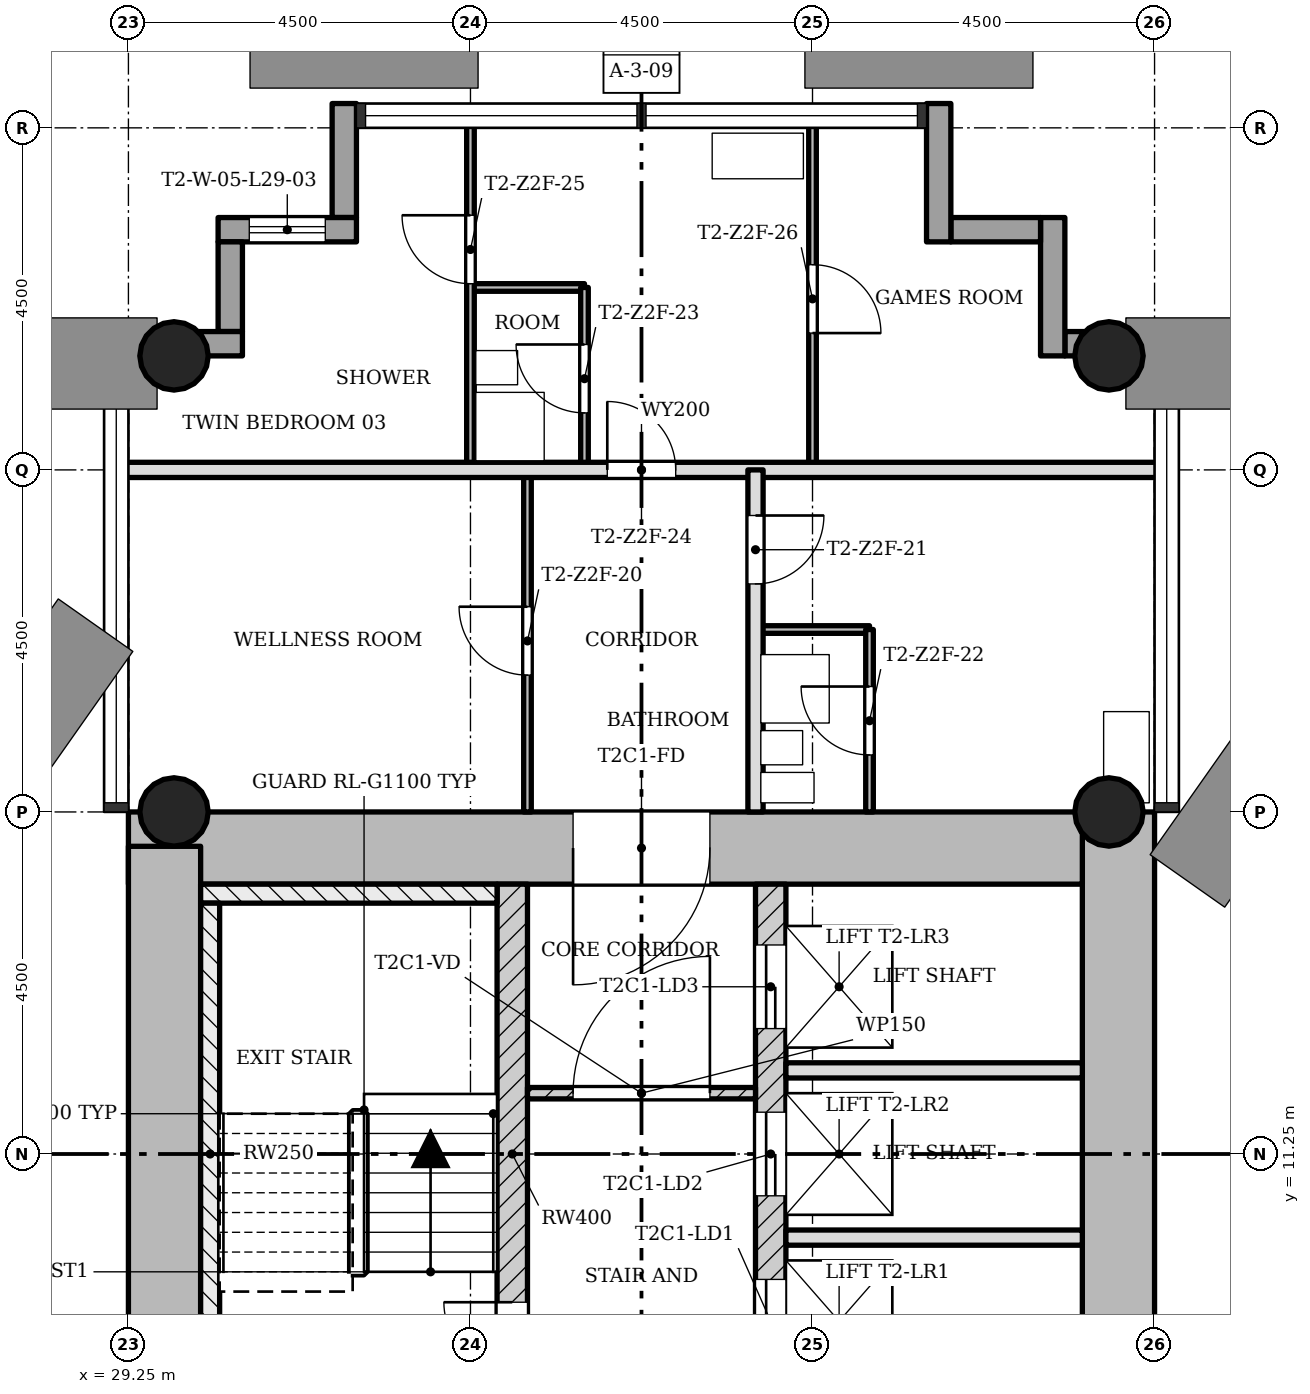
"""IFC4 building model, lengths in metres.
Left out: names, types, materials, properties, quantities, classifications, styles, units other than length and angle.
Written with IfcOpenShell. Run it as: python <this file> out.ifc"""

import sys

from ifc_helpers import new_model, si_unit, direction, frame, frame_2d, origin, origin_2d, place, context, subcontext, project, spatial, rectangle, hollow_circle, extrude, element, fill, save


model = new_model("IFC4")
c1 = context("Model", 3, precision=1e-05, world=origin(), true_north=direction((0.0, 1.0)))
c2 = subcontext(c1, "Body", "Model", "MODEL_VIEW")
j1 = project(units=[si_unit("LENGTHUNIT", "METRE"), si_unit("PLANEANGLEUNIT", "RADIAN")], contexts=[c1])
p1 = place(None, origin())
s1 = spatial("IfcSite", under=j1, at=p1, CompositionType="ELEMENT")
p2 = place(p1, origin())
s2 = spatial("IfcBuilding", under=s1, at=p2, CompositionType="ELEMENT")
p3 = place(p2, frame((0.0, 0.0, 107.2)))
s3 = spatial("IfcBuildingStorey", under=s2, at=p3, CompositionType="ELEMENT", Elevation=107.2)
p4 = place(p3, frame((42.275, 7.7, 0.0), z_axis=(0.0, 0.0, 1.0), x_axis=(0.0, 1.0, 0.0)))
e1 = element("IfcWall", 1, at=p4, inside=s3, PredefinedType="SHEAR", context=c2, shape_type="SweptSolid", body=[
    extrude(rectangle(XDim=8.05, YDim=0.95, at=frame_2d((4.025, 0.0))), origin(), (0.0, 0.0, 1.0), 3.4),
])
p5 = place(p3, frame((41.8, 15.275, 0.0), z_axis=(0.0, 0.0, 1.0), x_axis=(-1.0, 0.0, 0.0)))
e2 = element("IfcWall", 2, at=p5, inside=s3, PredefinedType="SHEAR", context=c2, shape_type="SweptSolid", body=[
    extrude(rectangle(XDim=12.55, YDim=0.95, at=frame_2d((6.275, 0.0))), origin(), (0.0, 0.0, 1.0), 3.4),
])
p6 = place(p5, frame((4.9, 0.0, 0.0)))
e3 = element("IfcOpeningElement", 3, at=p6, cuts=e2, PredefinedType="OPENING", context=c2, shape_type="SweptSolid", body=[
    extrude(rectangle(XDim=1.8, YDim=2.1, at=frame_2d((0.9, 1.05))), frame((0.0, 0.485, 0.0), z_axis=(0.0, -1.0, 0.0), x_axis=(1.0, 0.0, 0.0)), (0.0, 0.0, 1.0), 0.97),
])
p7 = place(p3, frame((29.725, 15.298, 0.0), z_axis=(0.0, 0.0, 1.0), x_axis=(0.0, -1.0, 0.0)))
e4 = element("IfcWall", 4, at=p7, inside=s3, PredefinedType="SHEAR", context=c2, shape_type="SweptSolid", body=[
    extrude(rectangle(XDim=8.696, YDim=0.95, at=frame_2d((4.348, 0.0))), origin(), (0.0, 0.0, 1.0), 3.4),
])
p8 = place(p3, frame((34.3, 7.7, 0.0), z_axis=(0.0, 0.0, 1.0), x_axis=(0.0, 1.0, 0.0)))
e5 = element("IfcWall", 5, at=p8, inside=s3, PredefinedType="SHEAR", context=c2, shape_type="SweptSolid", body=[
    extrude(rectangle(XDim=7.1, YDim=0.4, at=frame_2d((3.55, 0.0))), origin(), (0.0, 0.0, 1.0), 3.4),
])
p9 = place(p8, frame((0.7, 0.0, 0.0)))
e6 = element("IfcOpeningElement", 6, at=p9, cuts=e5, PredefinedType="OPENING", context=c2, shape_type="SweptSolid", body=[
    extrude(rectangle(XDim=0.9, YDim=2.1, at=frame_2d((0.45, 1.05))), frame((0.0, 0.21, 0.0), z_axis=(0.0, -1.0, 0.0), x_axis=(1.0, 0.0, 0.0)), (0.0, 0.0, 1.0), 0.42),
])
p10 = place(p3, frame((37.7, 7.7, 0.0), z_axis=(0.0, 0.0, 1.0), x_axis=(0.0, 1.0, 0.0)))
e7 = element("IfcWall", 7, at=p10, inside=s3, PredefinedType="SHEAR", context=c2, shape_type="SweptSolid", body=[
    extrude(rectangle(XDim=7.1, YDim=0.4, at=frame_2d((3.55, 0.0))), origin(), (0.0, 0.0, 1.0), 3.4),
])
p11 = place(p10, frame((0.8, 0.0, 0.0)))
e8 = element("IfcOpeningElement", 8, at=p11, cuts=e7, PredefinedType="OPENING", context=c2, shape_type="SweptSolid", body=[
    extrude(rectangle(XDim=1.1, YDim=2.1, at=frame_2d((0.55, 1.05))), frame((0.0, 0.21, 0.0), z_axis=(0.0, -1.0, 0.0), x_axis=(1.0, 0.0, 0.0)), (0.0, 0.0, 1.0), 0.42),
])
p12 = place(p10, frame((3.0, 0.0, 0.0)))
e9 = element("IfcOpeningElement", 9, at=p12, cuts=e7, PredefinedType="OPENING", context=c2, shape_type="SweptSolid", body=[
    extrude(rectangle(XDim=1.1, YDim=2.1, at=frame_2d((0.55, 1.05))), frame((0.0, 0.21, 0.0), z_axis=(0.0, -1.0, 0.0), x_axis=(1.0, 0.0, 0.0)), (0.0, 0.0, 1.0), 0.42),
])
p13 = place(p10, frame((5.2, 0.0, 0.0)))
e10 = element("IfcOpeningElement", 10, at=p13, cuts=e7, PredefinedType="OPENING", context=c2, shape_type="SweptSolid", body=[
    extrude(rectangle(XDim=1.1, YDim=2.1, at=frame_2d((0.55, 1.05))), frame((0.0, 0.21, 0.0), z_axis=(0.0, -1.0, 0.0), x_axis=(1.0, 0.0, 0.0)), (0.0, 0.0, 1.0), 0.42),
])
for number, where, z_axis, x_axis in (
    (11, (42.15, 15.75, 0.0), (0.0, 0.0, 1.0), (1.0, 0.0, 0.0)),
    (12, (29.85, 15.75, 0.0), (0.0, 0.0, 1.0), (1.0, 0.0, 0.0)),
    (13, (42.15, 21.75, 0.0), (0.0, 0.0, 1.0), (1.0, 0.0, 0.0)),
    (14, (29.85, 21.75, 0.0), (0.0, 0.0, 1.0), (1.0, 0.0, 0.0)),
):
    element("IfcColumn", number, at=place(p3, frame(where, z_axis=z_axis, x_axis=x_axis)), inside=s3, PredefinedType="COLUMN", context=c2, shape_type="SweptSolid", body=[
        extrude(hollow_circle(Radius=0.45, WallThickness=0.032, at=origin_2d()), origin(), (0.0, 0.0, 1.0), 3.4),
    ])
p14 = place(p3, frame((43.07, 21.91, -0.3), z_axis=(0.0, 0.0, 1.0), x_axis=(-1.0, 0.0, 0.0)))
e15 = element("IfcWall", 15, at=p14, inside=s3, PredefinedType="STANDARD", context=c2, shape_type="SweptSolid", body=[
    extrude(rectangle(XDim=1.5, YDim=0.32, at=frame_2d((0.75, 0.0))), origin(), (0.0, 0.0, 1.0), 3.4),
])
p15 = place(p3, frame((41.41, 21.75, -0.3), z_axis=(0.0, 0.0, 1.0), x_axis=(0.0, 1.0, 0.0)))
e16 = element("IfcWall", 16, at=p15, inside=s3, PredefinedType="STANDARD", context=c2, shape_type="SweptSolid", body=[
    extrude(rectangle(XDim=1.82, YDim=0.32, at=frame_2d((0.91, 0.0))), origin(), (0.0, 0.0, 1.0), 3.4),
])
p16 = place(p3, frame((41.25, 23.41, -0.3), z_axis=(0.0, 0.0, 1.0), x_axis=(-1.0, 0.0, 0.0)))
e17 = element("IfcWall", 17, at=p16, inside=s3, PredefinedType="STANDARD", context=c2, shape_type="SweptSolid", body=[
    extrude(rectangle(XDim=1.18, YDim=0.32, at=frame_2d((0.59, 0.0))), origin(), (0.0, 0.0, 1.0), 3.4),
])
p17 = place(p3, frame((39.91, 23.25, -0.3), z_axis=(0.0, 0.0, 1.0), x_axis=(0.0, 1.0, 0.0)))
e18 = element("IfcWall", 18, at=p17, inside=s3, PredefinedType="STANDARD", context=c2, shape_type="SweptSolid", body=[
    extrude(rectangle(XDim=1.82, YDim=0.32, at=frame_2d((0.91, 0.0))), origin(), (0.0, 0.0, 1.0), 3.4),
])
p18 = place(p3, frame((32.09, 25.07, -0.3), z_axis=(0.0, 0.0, 1.0), x_axis=(0.0, -1.0, 0.0)))
e19 = element("IfcWall", 19, at=p18, inside=s3, PredefinedType="STANDARD", context=c2, shape_type="SweptSolid", body=[
    extrude(rectangle(XDim=1.5, YDim=0.32, at=frame_2d((0.75, 0.0))), origin(), (0.0, 0.0, 1.0), 3.4),
])
p19 = place(p3, frame((32.25, 23.41, -0.3), z_axis=(0.0, 0.0, 1.0), x_axis=(-1.0, 0.0, 0.0)))
e20 = element("IfcWall", 20, at=p19, inside=s3, PredefinedType="STANDARD", context=c2, shape_type="SweptSolid", body=[
    extrude(rectangle(XDim=1.82, YDim=0.32, at=frame_2d((0.91, 0.0))), origin(), (0.0, 0.0, 1.0), 3.4),
])
p20 = place(p19, frame((0.41, 0.0, 1.2)))
e21 = element("IfcOpeningElement", 21, at=p20, cuts=e20, PredefinedType="OPENING", context=c2, shape_type="SweptSolid", body=[
    extrude(rectangle(XDim=1.0, YDim=1.5, at=frame_2d((0.5, 0.75))), frame((0.0, 0.17, 0.0), z_axis=(0.0, -1.0, 0.0), x_axis=(1.0, 0.0, 0.0)), (0.0, 0.0, 1.0), 0.34),
])
p21 = place(p3, frame((30.59, 23.25, -0.3), z_axis=(0.0, 0.0, 1.0), x_axis=(0.0, -1.0, 0.0)))
e22 = element("IfcWall", 22, at=p21, inside=s3, PredefinedType="STANDARD", context=c2, shape_type="SweptSolid", body=[
    extrude(rectangle(XDim=1.18, YDim=0.32, at=frame_2d((0.59, 0.0))), origin(), (0.0, 0.0, 1.0), 3.4),
])
p22 = place(p3, frame((30.75, 21.91, -0.3), z_axis=(0.0, 0.0, 1.0), x_axis=(-1.0, 0.0, 0.0)))
e23 = element("IfcWall", 23, at=p22, inside=s3, PredefinedType="STANDARD", context=c2, shape_type="SweptSolid", body=[
    extrude(rectangle(XDim=1.82, YDim=0.32, at=frame_2d((0.91, 0.0))), origin(), (0.0, 0.0, 1.0), 3.4),
])
p23 = place(p3, frame((37.5, 12.05, 0.0), z_axis=(0.0, 0.0, 1.0), x_axis=(-1.0, 0.0, 0.0)))
e24 = element("IfcWall", 24, at=p23, inside=s3, PredefinedType="PARTITIONING", context=c2, shape_type="SweptSolid", body=[
    extrude(rectangle(XDim=3.0, YDim=0.15, at=frame_2d((1.5, 0.0))), origin(), (0.0, 0.0, 1.0), 3.0),
])
p24 = place(p23, frame((0.6, 0.0, 0.0)))
e25 = element("IfcOpeningElement", 25, at=p24, cuts=e24, PredefinedType="OPENING", context=c2, shape_type="SweptSolid", body=[
    extrude(rectangle(XDim=1.8, YDim=2.1, at=frame_2d((0.9, 1.05))), frame((0.0, 0.085, 0.0), z_axis=(0.0, -1.0, 0.0), x_axis=(1.0, 0.0, 0.0)), (0.0, 0.0, 1.0), 0.17),
])
for number, where, z_axis, x_axis in (
    (26, (41.8, 10.15, 0.0), (0.0, 0.0, 1.0), (-1.0, 0.0, 0.0)),
    (27, (41.8, 12.35, 0.0), (0.0, 0.0, 1.0), (-1.0, 0.0, 0.0)),
):
    element("IfcWall", number, at=place(p3, frame(where, z_axis=z_axis, x_axis=x_axis)), inside=s3, PredefinedType="SOLIDWALL", context=c2, shape_type="SweptSolid", body=[
        extrude(rectangle(XDim=3.9, YDim=0.2, at=frame_2d((1.95, 0.0))), origin(), (0.0, 0.0, 1.0), 3.0),
    ])
p25 = place(p3, frame((39.0, 18.15, 0.0), z_axis=(0.0, 0.0, 1.0), x_axis=(-1.0, 0.0, 0.0)))
e28 = element("IfcWall", 28, at=p25, inside=s3, PredefinedType="PARTITIONING", context=c2, shape_type="SweptSolid", body=[
    extrude(rectangle(XDim=1.5, YDim=0.1, at=frame_2d((0.75, 0.0))), origin(), (0.0, 0.0, 1.0), 3.0),
])
p26 = place(p3, frame((42.85, 20.25, 0.0), z_axis=(0.0, 0.0, 1.0), x_axis=(-1.0, 0.0, 0.0)))
e29 = element("IfcWall", 29, at=p26, inside=s3, PredefinedType="SOLIDWALL", context=c2, shape_type="SweptSolid", body=[
    extrude(rectangle(XDim=13.7, YDim=0.2, at=frame_2d((6.85, 0.0))), origin(), (0.0, 0.0, 1.0), 3.0),
])
p27 = place(p26, frame((6.4, 0.0, 0.0)))
e30 = element("IfcOpeningElement", 30, at=p27, cuts=e29, PredefinedType="OPENING", context=c2, shape_type="SweptSolid", body=[
    extrude(rectangle(XDim=0.9, YDim=2.1, at=frame_2d((0.45, 1.05))), frame((0.0, 0.11, 0.0), z_axis=(0.0, -1.0, 0.0), x_axis=(1.0, 0.0, 0.0)), (0.0, 0.0, 1.0), 0.22),
])
p28 = place(p3, frame((35.25, 22.65, 0.0), z_axis=(0.0, 0.0, 1.0), x_axis=(-1.0, 0.0, 0.0)))
e31 = element("IfcWall", 31, at=p28, inside=s3, PredefinedType="PARTITIONING", context=c2, shape_type="SweptSolid", body=[
    extrude(rectangle(XDim=1.5, YDim=0.1, at=frame_2d((0.75, 0.0))), origin(), (0.0, 0.0, 1.0), 3.0),
])
p29 = place(p3, frame((39.0, 15.75, 0.0), z_axis=(0.0, 0.0, 1.0), x_axis=(0.0, 1.0, 0.0)))
e32 = element("IfcWall", 32, at=p29, inside=s3, PredefinedType="PARTITIONING", context=c2, shape_type="SweptSolid", body=[
    extrude(rectangle(XDim=2.4, YDim=0.1, at=frame_2d((1.2, 0.0))), origin(), (0.0, 0.0, 1.0), 3.0),
])
p30 = place(p29, frame((0.75, 0.0, 0.0)))
e33 = element("IfcOpeningElement", 33, at=p30, cuts=e32, PredefinedType="OPENING", context=c2, shape_type="SweptSolid", body=[
    extrude(rectangle(XDim=0.9, YDim=2.1, at=frame_2d((0.45, 1.05))), frame((0.0, 0.06, 0.0), z_axis=(0.0, -1.0, 0.0), x_axis=(1.0, 0.0, 0.0)), (0.0, 0.0, 1.0), 0.12),
])
p31 = place(p3, frame((38.25, 20.25, 0.0), z_axis=(0.0, 0.0, 1.0), x_axis=(0.0, 1.0, 0.0)))
e34 = element("IfcWall", 34, at=p31, inside=s3, PredefinedType="PARTITIONING", context=c2, shape_type="SweptSolid", body=[
    extrude(rectangle(XDim=4.6, YDim=0.1, at=frame_2d((2.3, 0.0))), origin(), (0.0, 0.0, 1.0), 3.0),
])
p32 = place(p31, frame((1.8, 0.0, 0.0)))
e35 = element("IfcOpeningElement", 35, at=p32, cuts=e34, PredefinedType="OPENING", context=c2, shape_type="SweptSolid", body=[
    extrude(rectangle(XDim=0.9, YDim=2.1, at=frame_2d((0.45, 1.05))), frame((0.0, 0.06, 0.0), z_axis=(0.0, -1.0, 0.0), x_axis=(1.0, 0.0, 0.0)), (0.0, 0.0, 1.0), 0.12),
])
p33 = place(p3, frame((37.5, 15.75, 0.0), z_axis=(0.0, 0.0, 1.0), x_axis=(0.0, 1.0, 0.0)))
e36 = element("IfcWall", 36, at=p33, inside=s3, PredefinedType="SOLIDWALL", context=c2, shape_type="SweptSolid", body=[
    extrude(rectangle(XDim=4.5, YDim=0.2, at=frame_2d((2.25, 0.0))), origin(), (0.0, 0.0, 1.0), 3.0),
])
p34 = place(p33, frame((3.0, 0.0, 0.0)))
e37 = element("IfcOpeningElement", 37, at=p34, cuts=e36, PredefinedType="OPENING", context=c2, shape_type="SweptSolid", body=[
    extrude(rectangle(XDim=0.9, YDim=2.1, at=frame_2d((0.45, 1.05))), frame((0.0, 0.11, 0.0), z_axis=(0.0, -1.0, 0.0), x_axis=(1.0, 0.0, 0.0)), (0.0, 0.0, 1.0), 0.22),
])
p35 = place(p3, frame((35.25, 20.25, 0.0), z_axis=(0.0, 0.0, 1.0), x_axis=(0.0, 1.0, 0.0)))
e38 = element("IfcWall", 38, at=p35, inside=s3, PredefinedType="PARTITIONING", context=c2, shape_type="SweptSolid", body=[
    extrude(rectangle(XDim=2.4, YDim=0.1, at=frame_2d((1.2, 0.0))), origin(), (0.0, 0.0, 1.0), 3.0),
])
p36 = place(p35, frame((0.75, 0.0, 0.0)))
e39 = element("IfcOpeningElement", 39, at=p36, cuts=e38, PredefinedType="OPENING", context=c2, shape_type="SweptSolid", body=[
    extrude(rectangle(XDim=0.9, YDim=2.1, at=frame_2d((0.45, 1.05))), frame((0.0, 0.06, 0.0), z_axis=(0.0, -1.0, 0.0), x_axis=(1.0, 0.0, 0.0)), (0.0, 0.0, 1.0), 0.12),
])
p37 = place(p3, frame((34.5, 15.75, 0.0), z_axis=(0.0, 0.0, 1.0), x_axis=(0.0, 1.0, 0.0)))
e40 = element("IfcWall", 40, at=p37, inside=s3, PredefinedType="PARTITIONING", context=c2, shape_type="SweptSolid", body=[
    extrude(rectangle(XDim=4.5, YDim=0.1, at=frame_2d((2.25, 0.0))), origin(), (0.0, 0.0, 1.0), 3.0),
])
p38 = place(p37, frame((1.8, 0.0, 0.0)))
e41 = element("IfcOpeningElement", 41, at=p38, cuts=e40, PredefinedType="OPENING", context=c2, shape_type="SweptSolid", body=[
    extrude(rectangle(XDim=0.9, YDim=2.1, at=frame_2d((0.45, 1.05))), frame((0.0, 0.06, 0.0), z_axis=(0.0, -1.0, 0.0), x_axis=(1.0, 0.0, 0.0)), (0.0, 0.0, 1.0), 0.12),
])
p39 = place(p3, frame((33.75, 20.25, 0.0), z_axis=(0.0, 0.0, 1.0), x_axis=(0.0, 1.0, 0.0)))
e42 = element("IfcWall", 42, at=p39, inside=s3, PredefinedType="PARTITIONING", context=c2, shape_type="SweptSolid", body=[
    extrude(rectangle(XDim=4.6, YDim=0.1, at=frame_2d((2.3, 0.0))), origin(), (0.0, 0.0, 1.0), 3.0),
])
p40 = place(p39, frame((2.45, 0.0, 0.0)))
e43 = element("IfcOpeningElement", 43, at=p40, cuts=e42, PredefinedType="OPENING", context=c2, shape_type="SweptSolid", body=[
    extrude(rectangle(XDim=0.9, YDim=2.1, at=frame_2d((0.45, 1.05))), frame((0.0, 0.06, 0.0), z_axis=(0.0, -1.0, 0.0), x_axis=(1.0, 0.0, 0.0)), (0.0, 0.0, 1.0), 0.12),
])
p41 = place(p3, frame((34.1, 14.675, 0.0), z_axis=(0.0, 0.0, 1.0), x_axis=(-1.0, 0.0, 0.0)))
e44 = element("IfcWall", 44, at=p41, inside=s3, PredefinedType="SHEAR", context=c2, shape_type="SweptSolid", body=[
    extrude(rectangle(XDim=3.9, YDim=0.25, at=frame_2d((1.95, 0.0))), origin(), (0.0, 0.0, 1.0), 3.4),
])
p42 = place(p3, frame((30.325, 7.95, 0.0), z_axis=(0.0, 0.0, 1.0), x_axis=(0.0, 1.0, 0.0)))
e45 = element("IfcWall", 45, at=p42, inside=s3, PredefinedType="SHEAR", context=c2, shape_type="SweptSolid", body=[
    extrude(rectangle(XDim=6.6, YDim=0.25, at=frame_2d((3.3, 0.0))), origin(), (0.0, 0.0, 1.0), 3.4),
])
p43 = place(p24, origin())
e46 = element("IfcDoor", 46, at=p43, inside=s3, OperationType="SINGLE_SWING_LEFT", PredefinedType="DOOR", context=c2, shape_type="SweptSolid", body=[
    extrude(rectangle(XDim=1.8, YDim=2.1, at=frame_2d((0.9, 1.05))), frame((0.0, 0.025, 0.0), z_axis=(0.0, -1.0, 0.0), x_axis=(1.0, 0.0, 0.0)), (0.0, 0.0, 1.0), 0.05),
])
fill(e25, e46)
p44 = place(p38, origin())
e47 = element("IfcDoor", 47, at=p44, inside=s3, OperationType="SINGLE_SWING_LEFT", PredefinedType="DOOR", context=c2, shape_type="SweptSolid", body=[
    extrude(rectangle(XDim=0.9, YDim=2.1, at=frame_2d((0.45, 1.05))), frame((0.0, 0.025, 0.0), z_axis=(0.0, -1.0, 0.0), x_axis=(1.0, 0.0, 0.0)), (0.0, 0.0, 1.0), 0.05),
])
fill(e41, e47)
p45 = place(p34, origin())
e48 = element("IfcDoor", 48, at=p45, inside=s3, OperationType="SINGLE_SWING_RIGHT", PredefinedType="DOOR", context=c2, shape_type="SweptSolid", body=[
    extrude(rectangle(XDim=0.9, YDim=2.1, at=frame_2d((0.45, 1.05))), frame((0.0, 0.025, 0.0), z_axis=(0.0, -1.0, 0.0), x_axis=(1.0, 0.0, 0.0)), (0.0, 0.0, 1.0), 0.05),
])
fill(e37, e48)
p46 = place(p30, origin())
e49 = element("IfcDoor", 49, at=p46, inside=s3, OperationType="SINGLE_SWING_LEFT", PredefinedType="DOOR", context=c2, shape_type="SweptSolid", body=[
    extrude(rectangle(XDim=0.9, YDim=2.1, at=frame_2d((0.45, 1.05))), frame((0.0, 0.025, 0.0), z_axis=(0.0, -1.0, 0.0), x_axis=(1.0, 0.0, 0.0)), (0.0, 0.0, 1.0), 0.05),
])
fill(e33, e49)
p47 = place(p36, origin())
e50 = element("IfcDoor", 50, at=p47, inside=s3, OperationType="SINGLE_SWING_LEFT", PredefinedType="DOOR", context=c2, shape_type="SweptSolid", body=[
    extrude(rectangle(XDim=0.9, YDim=2.1, at=frame_2d((0.45, 1.05))), frame((0.0, 0.025, 0.0), z_axis=(0.0, -1.0, 0.0), x_axis=(1.0, 0.0, 0.0)), (0.0, 0.0, 1.0), 0.05),
])
fill(e39, e50)
p48 = place(p27, origin())
e51 = element("IfcDoor", 51, at=p48, inside=s3, OperationType="SINGLE_SWING_RIGHT", PredefinedType="DOOR", context=c2, shape_type="SweptSolid", body=[
    extrude(rectangle(XDim=0.9, YDim=2.1, at=frame_2d((0.45, 1.05))), frame((0.0, 0.025, 0.0), z_axis=(0.0, -1.0, 0.0), x_axis=(1.0, 0.0, 0.0)), (0.0, 0.0, 1.0), 0.05),
])
fill(e30, e51)
p49 = place(p40, origin())
e52 = element("IfcDoor", 52, at=p49, inside=s3, OperationType="SINGLE_SWING_LEFT", PredefinedType="DOOR", context=c2, shape_type="SweptSolid", body=[
    extrude(rectangle(XDim=0.9, YDim=2.1, at=frame_2d((0.45, 1.05))), frame((0.0, 0.025, 0.0), z_axis=(0.0, -1.0, 0.0), x_axis=(1.0, 0.0, 0.0)), (0.0, 0.0, 1.0), 0.05),
])
fill(e43, e52)
p50 = place(p32, origin())
e53 = element("IfcDoor", 53, at=p50, inside=s3, OperationType="SINGLE_SWING_LEFT", PredefinedType="DOOR", context=c2, shape_type="SweptSolid", body=[
    extrude(rectangle(XDim=0.9, YDim=2.1, at=frame_2d((0.45, 1.05))), frame((0.0, 0.025, 0.0), z_axis=(0.0, -1.0, 0.0), x_axis=(1.0, 0.0, 0.0)), (0.0, 0.0, 1.0), 0.05),
])
fill(e35, e53)
p51 = place(p9, origin())
e54 = element("IfcDoor", 54, at=p51, inside=s3, OperationType="SINGLE_SWING_LEFT", PredefinedType="DOOR", context=c2, shape_type="SweptSolid", body=[
    extrude(rectangle(XDim=0.9, YDim=2.1, at=frame_2d((0.45, 1.05))), frame((0.0, 0.025, 0.0), z_axis=(0.0, -1.0, 0.0), x_axis=(1.0, 0.0, 0.0)), (0.0, 0.0, 1.0), 0.05),
])
fill(e6, e54)
p52 = place(p11, origin())
e55 = element("IfcDoor", 55, at=p52, inside=s3, OperationType="SLIDING_TO_LEFT", PredefinedType="DOOR", context=c2, shape_type="SweptSolid", body=[
    extrude(rectangle(XDim=1.1, YDim=2.1, at=frame_2d((0.55, 1.05))), frame((0.0, 0.025, 0.0), z_axis=(0.0, -1.0, 0.0), x_axis=(1.0, 0.0, 0.0)), (0.0, 0.0, 1.0), 0.05),
])
fill(e8, e55)
p53 = place(p12, origin())
e56 = element("IfcDoor", 56, at=p53, inside=s3, OperationType="SLIDING_TO_LEFT", PredefinedType="DOOR", context=c2, shape_type="SweptSolid", body=[
    extrude(rectangle(XDim=1.1, YDim=2.1, at=frame_2d((0.55, 1.05))), frame((0.0, 0.025, 0.0), z_axis=(0.0, -1.0, 0.0), x_axis=(1.0, 0.0, 0.0)), (0.0, 0.0, 1.0), 0.05),
])
fill(e9, e56)
p54 = place(p13, origin())
e57 = element("IfcDoor", 57, at=p54, inside=s3, OperationType="SLIDING_TO_LEFT", PredefinedType="DOOR", context=c2, shape_type="SweptSolid", body=[
    extrude(rectangle(XDim=1.1, YDim=2.1, at=frame_2d((0.55, 1.05))), frame((0.0, 0.025, 0.0), z_axis=(0.0, -1.0, 0.0), x_axis=(1.0, 0.0, 0.0)), (0.0, 0.0, 1.0), 0.05),
])
fill(e10, e57)
p55 = place(p6, origin())
e58 = element("IfcDoor", 58, at=p55, inside=s3, OperationType="SINGLE_SWING_LEFT", PredefinedType="DOOR", context=c2, shape_type="SweptSolid", body=[
    extrude(rectangle(XDim=1.8, YDim=2.1, at=frame_2d((0.9, 1.05))), frame((0.0, 0.025, 0.0), z_axis=(0.0, -1.0, 0.0), x_axis=(1.0, 0.0, 0.0)), (0.0, 0.0, 1.0), 0.05),
])
fill(e3, e58)
p56 = place(p20, origin())
e59 = element("IfcWindow", 59, at=p56, inside=s3, PartitioningType="SINGLE_PANEL", PredefinedType="WINDOW", context=c2, shape_type="SweptSolid", body=[
    extrude(rectangle(XDim=1.0, YDim=1.5, at=frame_2d((0.5, 0.75))), frame((0.0, 0.03, 0.0), z_axis=(0.0, -1.0, 0.0), x_axis=(1.0, 0.0, 0.0)), (0.0, 0.0, 1.0), 0.06),
])
fill(e21, e59)
save(model, sys.argv[1])
